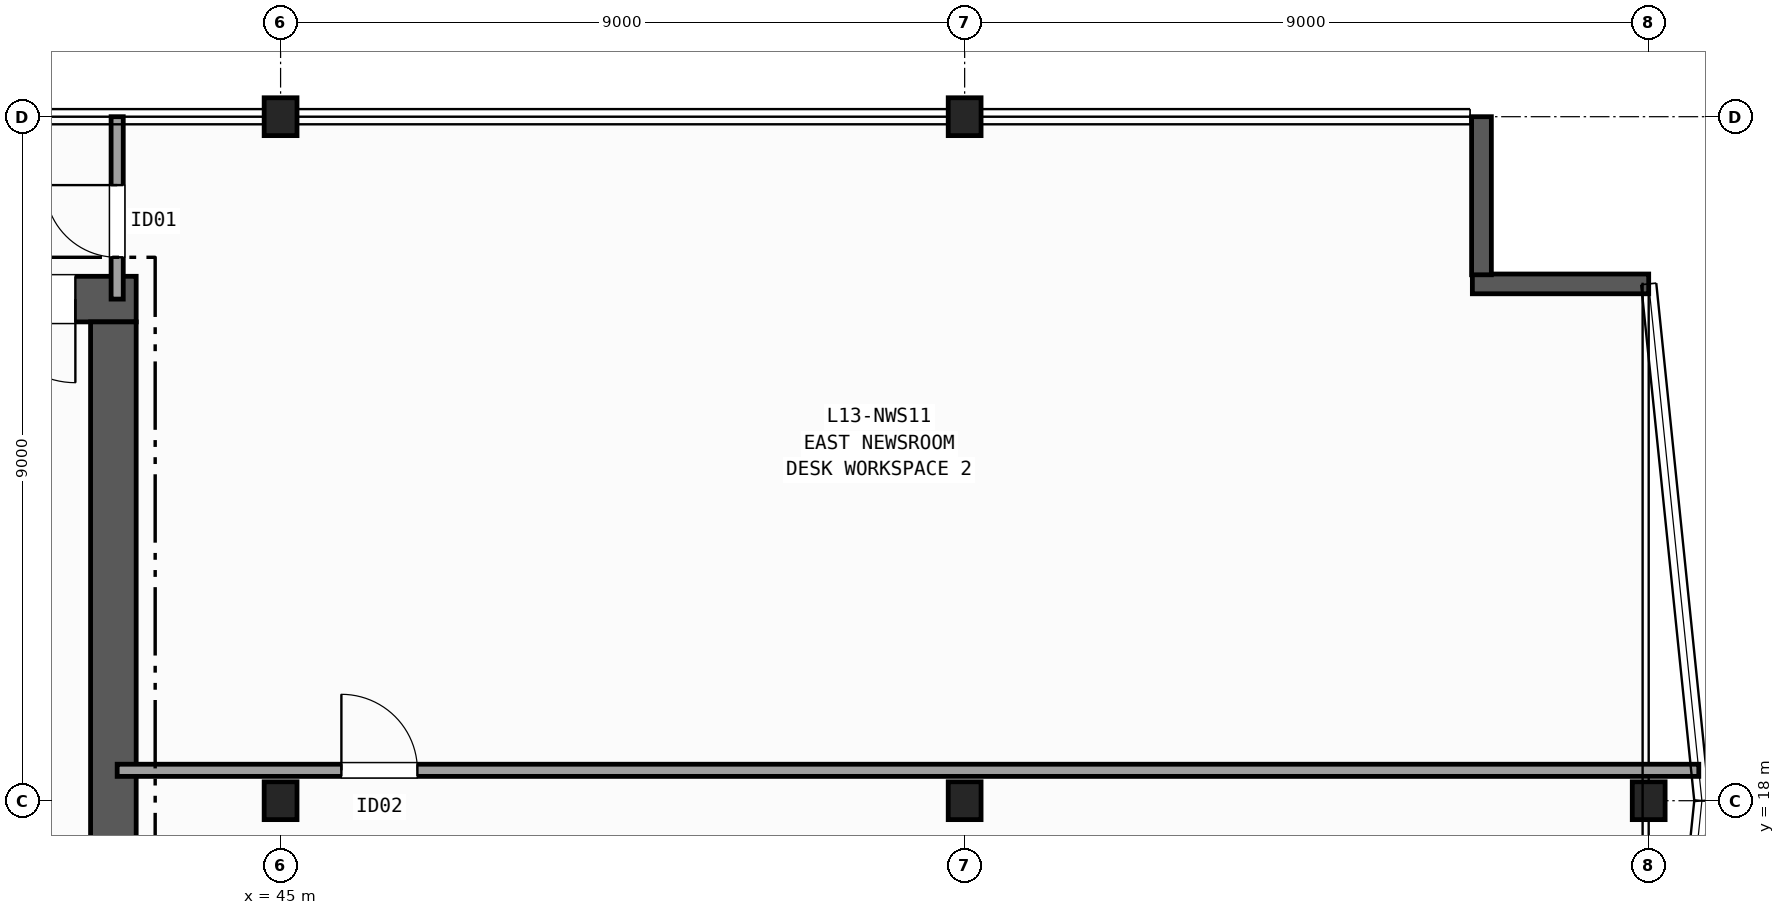
"""IFC4 building model, lengths in metres.
Left out: names, types, materials, properties, quantities, classifications, styles, units other than length and angle.
Written with IfcOpenShell. Run it as: python <this file> out.ifc"""

import sys

from ifc_helpers import new_model, si_unit, direction, frame, frame_2d, origin, origin_2d, place, context, subcontext, project, spatial, rectangle, i_section, extrude, element, fill, save


model = new_model("IFC4")
c1 = context("Model", 3, precision=1e-05, world=origin(), true_north=direction((0.0, 1.0)))
c2 = subcontext(c1, "Body", "Model", "MODEL_VIEW")
j1 = project(units=[si_unit("LENGTHUNIT", "METRE"), si_unit("PLANEANGLEUNIT", "RADIAN")], contexts=[c1])
p1 = place(None, origin())
s1 = spatial("IfcSite", under=j1, at=p1, CompositionType="ELEMENT")
p2 = place(p1, origin())
s2 = spatial("IfcBuilding", under=s1, at=p2, CompositionType="ELEMENT")
p3 = place(p2, frame((0.0, 0.0, 58.2)))
s3 = spatial("IfcBuildingStorey", under=s2, at=p3, CompositionType="ELEMENT", Elevation=58.2)
for number, where, z_axis, x_axis in (
    (1, (45.0, 18.0, 0.0), (0.0, 0.0, 1.0), (1.0, 0.0, 0.0)),
    (2, (45.0, 27.0, 0.0), (0.0, 0.0, 1.0), (1.0, 0.0, 0.0)),
    (3, (54.0, 18.0, 0.0), (0.0, 0.0, 1.0), (1.0, 0.0, 0.0)),
    (4, (54.0, 27.0, 0.0), (0.0, 0.0, 1.0), (1.0, 0.0, 0.0)),
    (5, (63.0, 18.0, 0.0), (0.0, 0.0, 1.0), (1.0, 0.0, 0.0)),
):
    element("IfcColumn", number, at=place(p3, frame(where, z_axis=z_axis, x_axis=x_axis)), inside=s3, PredefinedType="COLUMN", context=c2, shape_type="SweptSolid", body=[
        extrude(i_section(OverallWidth=0.432, OverallDepth=0.498, WebThickness=0.056, FlangeThickness=0.089, FilletRadius=0.015, at=origin_2d()), origin(), (0.0, 0.0, 1.0), 3.7),
    ])
p4 = place(p3, frame((63.0, 24.8, 0.0), z_axis=(0.0, 0.0, 1.0), x_axis=(-1.0, 0.0, 0.0)))
e6 = element("IfcWall", 6, at=p4, inside=s3, PredefinedType="SOLIDWALL", context=c2, shape_type="SweptSolid", body=[
    extrude(rectangle(XDim=2.32, YDim=0.26, at=frame_2d((1.16, 0.0))), origin(), (0.0, 0.0, 1.0), 3.42),
])
p5 = place(p3, frame((60.8, 24.92, 0.0), z_axis=(0.0, 0.0, 1.0), x_axis=(0.0, 1.0, 0.0)))
e7 = element("IfcWall", 7, at=p5, inside=s3, PredefinedType="SOLIDWALL", context=c2, shape_type="SweptSolid", body=[
    extrude(rectangle(XDim=2.08, YDim=0.26, at=frame_2d((1.04, 0.0))), origin(), (0.0, 0.0, 1.0), 3.42),
])
p6 = place(p3, frame((43.1, 24.6, 0.0), z_axis=(0.0, 0.0, 1.0), x_axis=(-1.0, 0.0, 0.0)))
e8 = element("IfcWall", 8, at=p6, inside=s3, PredefinedType="SHEAR", context=c2, shape_type="SweptSolid", body=[
    extrude(rectangle(XDim=14.0, YDim=0.6, at=frame_2d((7.0, 0.0))), origin(), (0.0, 0.0, 1.0), 3.42),
])
p7 = place(p6, frame((0.8, 0.0, 0.0)))
e9 = element("IfcOpeningElement", 9, at=p7, cuts=e8, PredefinedType="OPENING", context=c2, shape_type="SweptSolid", body=[
    extrude(rectangle(XDim=1.1, YDim=2.15, at=frame_2d((0.55, 1.075))), frame((0.0, 0.31, 0.0), z_axis=(0.0, -1.0, 0.0), x_axis=(1.0, 0.0, 0.0)), (0.0, 0.0, 1.0), 0.62),
])
p8 = place(p6, frame((2.3, 0.0, 0.0)))
e10 = element("IfcOpeningElement", 10, at=p8, cuts=e8, PredefinedType="OPENING", context=c2, shape_type="SweptSolid", body=[
    extrude(rectangle(XDim=0.9, YDim=2.1, at=frame_2d((0.45, 1.05))), frame((0.0, 0.31, 0.0), z_axis=(0.0, -1.0, 0.0), x_axis=(1.0, 0.0, 0.0)), (0.0, 0.0, 1.0), 0.62),
])
p9 = place(p6, frame((3.6, 0.0, 0.0)))
e11 = element("IfcOpeningElement", 11, at=p9, cuts=e8, PredefinedType="OPENING", context=c2, shape_type="SweptSolid", body=[
    extrude(rectangle(XDim=0.9, YDim=2.1, at=frame_2d((0.45, 1.05))), frame((0.0, 0.31, 0.0), z_axis=(0.0, -1.0, 0.0), x_axis=(1.0, 0.0, 0.0)), (0.0, 0.0, 1.0), 0.62),
])
p10 = place(p6, frame((4.95, 0.0, 0.0)))
e12 = element("IfcOpeningElement", 12, at=p10, cuts=e8, PredefinedType="OPENING", context=c2, shape_type="SweptSolid", body=[
    extrude(rectangle(XDim=0.9, YDim=2.1, at=frame_2d((0.45, 1.05))), frame((0.0, 0.31, 0.0), z_axis=(0.0, -1.0, 0.0), x_axis=(1.0, 0.0, 0.0)), (0.0, 0.0, 1.0), 0.62),
])
p11 = place(p3, frame((42.8, 11.5, 0.0), z_axis=(0.0, 0.0, 1.0), x_axis=(0.0, 1.0, 0.0)))
e13 = element("IfcWall", 13, at=p11, inside=s3, PredefinedType="SHEAR", context=c2, shape_type="SweptSolid", body=[
    extrude(rectangle(XDim=12.8, YDim=0.6, at=frame_2d((6.4, 0.0))), origin(), (0.0, 0.0, 1.0), 3.42),
])
p12 = place(p3, frame((42.85, 24.6, 0.0), z_axis=(0.0, 0.0, 1.0), x_axis=(0.0, 1.0, 0.0)))
e14 = element("IfcWall", 14, at=p12, inside=s3, PredefinedType="PARTITIONING", context=c2, shape_type="SweptSolid", body=[
    extrude(rectangle(XDim=2.4, YDim=0.16, at=frame_2d((1.2, 0.0))), origin(), (0.0, 0.0, 1.0), 2.627),
])
p13 = place(p12, frame((0.55, 0.0, 0.0)))
e15 = element("IfcOpeningElement", 15, at=p13, cuts=e14, PredefinedType="OPENING", context=c2, shape_type="SweptSolid", body=[
    extrude(rectangle(XDim=0.95, YDim=2.1, at=frame_2d((0.475, 1.05))), frame((0.0, 0.09, 0.0), z_axis=(0.0, -1.0, 0.0), x_axis=(1.0, 0.0, 0.0)), (0.0, 0.0, 1.0), 0.18),
])
p14 = place(p3, frame((42.85, 18.4, 0.0), z_axis=(0.0, 0.0, 1.0), x_axis=(1.0, 0.0, 0.0)))
e16 = element("IfcWall", 16, at=p14, inside=s3, PredefinedType="PARTITIONING", context=c2, shape_type="SweptSolid", body=[
    extrude(rectangle(XDim=20.809, YDim=0.16, at=frame_2d((10.404, 0.0))), origin(), (0.0, 0.0, 1.0), 3.42),
])
p15 = place(p14, frame((2.95, 0.0, 0.0)))
e17 = element("IfcOpeningElement", 17, at=p15, cuts=e16, PredefinedType="OPENING", context=c2, shape_type="SweptSolid", body=[
    extrude(rectangle(XDim=1.0, YDim=2.1, at=frame_2d((0.5, 1.05))), frame((0.0, 0.09, 0.0), z_axis=(0.0, -1.0, 0.0), x_axis=(1.0, 0.0, 0.0)), (0.0, 0.0, 1.0), 0.18),
])
p16 = place(p7, origin())
e18 = element("IfcDoor", 18, at=p16, inside=s3, OperationType="SINGLE_SWING_LEFT", PredefinedType="DOOR", context=c2, shape_type="SweptSolid", body=[
    extrude(rectangle(XDim=1.1, YDim=2.15, at=frame_2d((0.55, 1.075))), frame((0.0, 0.025, 0.0), z_axis=(0.0, -1.0, 0.0), x_axis=(1.0, 0.0, 0.0)), (0.0, 0.0, 1.0), 0.05),
])
fill(e9, e18)
p17 = place(p13, origin())
e19 = element("IfcDoor", 19, at=p17, inside=s3, OperationType="SINGLE_SWING_RIGHT", PredefinedType="DOOR", context=c2, shape_type="SweptSolid", body=[
    extrude(rectangle(XDim=0.95, YDim=2.1, at=frame_2d((0.475, 1.05))), frame((0.0, 0.025, 0.0), z_axis=(0.0, -1.0, 0.0), x_axis=(1.0, 0.0, 0.0)), (0.0, 0.0, 1.0), 0.05),
])
fill(e15, e19)
p18 = place(p15, origin())
e20 = element("IfcDoor", 20, at=p18, inside=s3, OperationType="SINGLE_SWING_LEFT", PredefinedType="DOOR", context=c2, shape_type="SweptSolid", body=[
    extrude(rectangle(XDim=1.0, YDim=2.1, at=frame_2d((0.5, 1.05))), frame((0.0, 0.025, 0.0), z_axis=(0.0, -1.0, 0.0), x_axis=(1.0, 0.0, 0.0)), (0.0, 0.0, 1.0), 0.05),
])
fill(e17, e20)
save(model, sys.argv[1])
